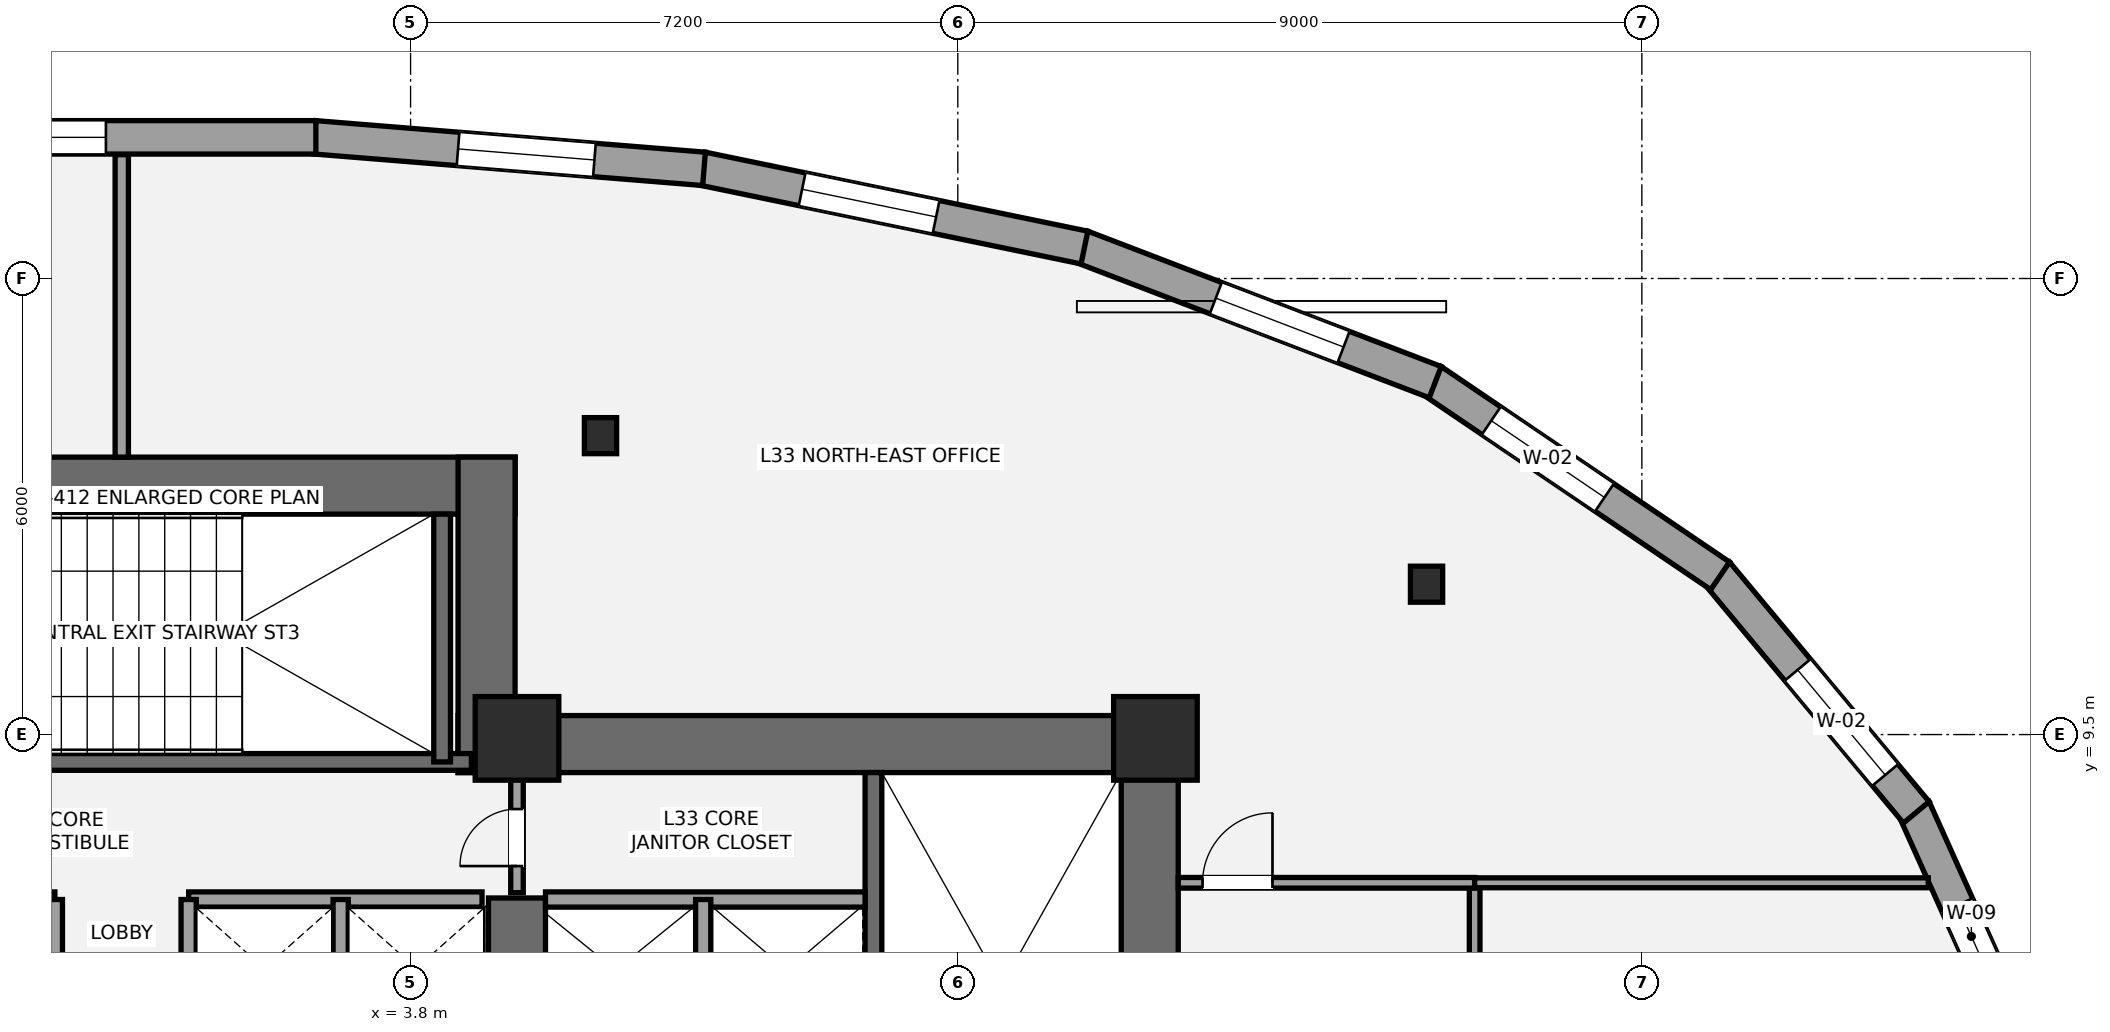
"""IFC4 building model, lengths in metres.
Left out: names, types, materials, properties, quantities, classifications, styles, units other than length and angle.
Written with IfcOpenShell. Run it as: python <this file> out.ifc"""

import sys

from ifc_helpers import new_model, si_unit, direction, frame, frame_2d, origin, origin_2d, place, context, subcontext, project, spatial, rectangle, i_section, extrude, element, fill, save


model = new_model("IFC4")
c1 = context("Model", 3, precision=1e-05, world=origin(), true_north=direction((0.0, 1.0)))
c2 = subcontext(c1, "Body", "Model", "MODEL_VIEW")
j1 = project(units=[si_unit("LENGTHUNIT", "METRE"), si_unit("PLANEANGLEUNIT", "RADIAN")], contexts=[c1])
p1 = place(None, origin())
s1 = spatial("IfcSite", under=j1, at=p1, CompositionType="ELEMENT")
p2 = place(p1, origin())
s2 = spatial("IfcBuilding", under=s1, at=p2, CompositionType="ELEMENT")
p3 = place(p2, frame((0.0, 0.0, 124.6)))
s3 = spatial("IfcBuildingStorey", under=s2, at=p3, CompositionType="ELEMENT", Elevation=124.6)
p4 = place(p3, frame((13.525, 1.1, 0.0), z_axis=(0.0, 0.0, 1.0), x_axis=(0.0, 1.0, 0.0)))
e1 = element("IfcWall", 1, at=p4, inside=s3, PredefinedType="SHEAR", context=c2, shape_type="SweptSolid", body=[
    extrude(rectangle(XDim=8.65, YDim=0.75, at=frame_2d((4.325, 0.0))), origin(), (0.0, 0.0, 1.0), 3.5),
])
p5 = place(p3, frame((4.425, 9.375, 0.0), z_axis=(0.0, 0.0, 1.0), x_axis=(1.0, 0.0, 0.0)))
e2 = element("IfcWall", 2, at=p5, inside=s3, PredefinedType="SHEAR", context=c2, shape_type="SweptSolid", body=[
    extrude(rectangle(XDim=9.475, YDim=0.75, at=frame_2d((4.737, 0.0))), origin(), (0.0, 0.0, 1.0), 3.5),
])
p6 = place(p3, frame((5.2, 5.35, 0.0), z_axis=(0.0, 0.0, 1.0), x_axis=(0.0, 1.0, 0.0)))
e3 = element("IfcWall", 3, at=p6, inside=s3, PredefinedType="SHEAR", context=c2, shape_type="SweptSolid", body=[
    extrude(rectangle(XDim=2.0, YDim=0.75, at=frame_2d((1.0, 0.0))), origin(), (0.0, 0.0, 1.0), 3.5),
])
p7 = place(p3, frame((9.89, 1.85, 0.0), z_axis=(0.0, 0.0, 1.0), x_axis=(0.0, 1.0, 0.0)))
e4 = element("IfcWall", 4, at=p7, inside=s3, PredefinedType="SHEAR", context=c2, shape_type="SweptSolid", body=[
    extrude(rectangle(XDim=7.15, YDim=0.22, at=frame_2d((3.575, 0.0))), origin(), (0.0, 0.0, 1.0), 3.5),
])
p8 = place(p3, frame((-5.175, 12.775, 0.0), z_axis=(0.0, 0.0, 1.0), x_axis=(1.0, 0.0, 0.0)))
e5 = element("IfcWall", 5, at=p8, inside=s3, PredefinedType="SHEAR", context=c2, shape_type="SweptSolid", body=[
    extrude(rectangle(XDim=10.35, YDim=0.75, at=frame_2d((5.175, 0.0))), origin(), (0.0, 0.0, 1.0), 3.5),
])
p9 = place(p3, frame((4.8, 9.0, 0.0), z_axis=(0.0, 0.0, 1.0), x_axis=(0.0, 1.0, 0.0)))
e6 = element("IfcWall", 6, at=p9, inside=s3, PredefinedType="SHEAR", context=c2, shape_type="SweptSolid", body=[
    extrude(rectangle(XDim=4.15, YDim=0.75, at=frame_2d((2.075, 0.0))), origin(), (0.0, 0.0, 1.0), 3.5),
])
p10 = place(p3, frame((-4.7, 9.14, 0.0), z_axis=(0.0, 0.0, 1.0), x_axis=(1.0, 0.0, 0.0)))
e7 = element("IfcWall", 7, at=p10, inside=s3, PredefinedType="SHEAR", context=c2, shape_type="SweptSolid", body=[
    extrude(rectangle(XDim=9.3, YDim=0.22, at=frame_2d((4.65, 0.0))), origin(), (0.0, 0.0, 1.0), 3.5),
])
p11 = place(p10, frame((1.15, 0.0, 0.0)))
e8 = element("IfcOpeningElement", 8, at=p11, cuts=e7, PredefinedType="OPENING", context=c2, shape_type="SweptSolid", body=[
    extrude(rectangle(XDim=1.05, YDim=2.15, at=frame_2d((0.525, 1.075))), frame((0.0, 0.12, 0.0), z_axis=(0.0, -1.0, 0.0), x_axis=(1.0, 0.0, 0.0)), (0.0, 0.0, 1.0), 0.24),
])
p12 = place(p3, frame((4.215, 9.14, 0.0), z_axis=(0.0, 0.0, 1.0), x_axis=(0.0, 1.0, 0.0)))
e9 = element("IfcWall", 9, at=p12, inside=s3, PredefinedType="SHEAR", context=c2, shape_type="SweptSolid", body=[
    extrude(rectangle(XDim=3.26, YDim=0.22, at=frame_2d((1.63, 0.0))), origin(), (0.0, 0.0, 1.0), 3.5),
])
for number, where, z_axis, x_axis in (
    (10, (5.2, 9.45, 0.0), (0.0, 0.0, 1.0), (1.0, 0.0, 0.0)),
    (11, (13.6, 9.45, 0.0), (0.0, 0.0, 1.0), (1.0, 0.0, 0.0)),
):
    element("IfcColumn", number, at=place(p3, frame(where, z_axis=z_axis, x_axis=x_axis)), inside=s3, PredefinedType="COLUMN", context=c2, shape_type="SweptSolid", body=[
        extrude(rectangle(XDim=1.1, YDim=1.1, at=origin_2d()), origin(), (0.0, 0.0, 1.0), 3.5),
    ])
for number, where, z_axis, x_axis in (
    (12, (17.167, 11.478, 0.0), (0.0, 0.0, 1.0), (1.0, 0.0, 0.0)),
    (13, (6.299, 13.433, 0.0), (0.0, 0.0, 1.0), (1.0, 0.0, 0.0)),
):
    element("IfcColumn", number, at=place(p3, frame(where, z_axis=z_axis, x_axis=x_axis)), inside=s3, PredefinedType="COLUMN", context=c2, shape_type="SweptSolid", body=[
        extrude(i_section(OverallWidth=0.424, OverallDepth=0.474, WebThickness=0.048, FlangeThickness=0.077, at=origin_2d()), origin(), (0.0, 0.0, 1.0), 3.5),
    ])
p13 = place(p3, frame((23.579, 8.528, 0.0), z_axis=(0.0, 0.0, 1.0), x_axis=(0.409835385481, -0.912159501846, 0.0)))
e14 = element("IfcWall", 14, at=p13, inside=s3, PredefinedType="STANDARD", context=c2, shape_type="SweptSolid", body=[
    extrude(rectangle(XDim=3.74, YDim=0.44, at=frame_2d((1.87, 0.0))), origin(), (0.0, 0.0, 1.0), 2.528),
])
p14 = place(p13, frame((1.395, 0.0, 0.58)))
e15 = element("IfcOpeningElement", 15, at=p14, cuts=e14, PredefinedType="OPENING", context=c2, shape_type="SweptSolid", body=[
    extrude(rectangle(XDim=0.9, YDim=1.35, at=frame_2d((0.45, 0.675))), frame((0.0, 0.23, 0.0), z_axis=(0.0, -1.0, 0.0), x_axis=(1.0, 0.0, 0.0)), (0.0, 0.0, 1.0), 0.46),
])
p15 = place(p3, frame((20.984, 11.629, 0.0), z_axis=(0.0, 0.0, 1.0), x_axis=(0.640084904994, -0.768304180906, 0.0)))
e16 = element("IfcWall", 16, at=p15, inside=s3, PredefinedType="STANDARD", context=c2, shape_type="SweptSolid", body=[
    extrude(rectangle(XDim=4.103, YDim=0.44, at=frame_2d((2.052, 0.0))), origin(), (0.0, 0.0, 1.0), 2.528),
])
p16 = place(p15, frame((1.664, 0.0, 0.65)))
e17 = element("IfcOpeningElement", 17, at=p16, cuts=e16, PredefinedType="OPENING", context=c2, shape_type="SweptSolid", body=[
    extrude(rectangle(XDim=1.8, YDim=1.7, at=frame_2d((0.9, 0.85))), frame((0.0, 0.23, 0.0), z_axis=(0.0, -1.0, 0.0), x_axis=(1.0, 0.0, 0.0)), (0.0, 0.0, 1.0), 0.46),
])
p17 = place(p3, frame((17.237, 14.16, 0.0), z_axis=(0.0, 0.0, 1.0), x_axis=(0.827672849676, -0.561210881852, 0.0)))
e18 = element("IfcWall", 18, at=p17, inside=s3, PredefinedType="STANDARD", context=c2, shape_type="SweptSolid", body=[
    extrude(rectangle(XDim=4.583, YDim=0.44, at=frame_2d((2.292, 0.0))), origin(), (0.0, 0.0, 1.0), 2.528),
])
p18 = place(p17, frame((0.945, 0.0, 0.65)))
e19 = element("IfcOpeningElement", 19, at=p18, cuts=e18, PredefinedType="OPENING", context=c2, shape_type="SweptSolid", body=[
    extrude(rectangle(XDim=1.8, YDim=1.7, at=frame_2d((0.9, 0.85))), frame((0.0, 0.23, 0.0), z_axis=(0.0, -1.0, 0.0), x_axis=(1.0, 0.0, 0.0)), (0.0, 0.0, 1.0), 0.46),
])
p19 = place(p3, frame((12.632, 15.917, 0.0), z_axis=(0.0, 0.0, 1.0), x_axis=(0.933853964101, -0.357654545243, 0.0)))
e20 = element("IfcWall", 20, at=p19, inside=s3, PredefinedType="STANDARD", context=c2, shape_type="SweptSolid", body=[
    extrude(rectangle(XDim=4.979, YDim=0.44, at=frame_2d((2.49, 0.0))), origin(), (0.0, 0.0, 1.0), 2.528),
])
p20 = place(p19, frame((1.887, 0.0, 0.65)))
e21 = element("IfcOpeningElement", 21, at=p20, cuts=e20, PredefinedType="OPENING", context=c2, shape_type="SweptSolid", body=[
    extrude(rectangle(XDim=1.8, YDim=1.7, at=frame_2d((0.9, 0.85))), frame((0.0, 0.23, 0.0), z_axis=(0.0, -1.0, 0.0), x_axis=(1.0, 0.0, 0.0)), (0.0, 0.0, 1.0), 0.46),
])
p21 = place(p3, frame((7.634, 16.946, 0.0), z_axis=(0.0, 0.0, 1.0), x_axis=(0.979339014215, -0.202225357552, 0.0)))
e22 = element("IfcWall", 22, at=p21, inside=s3, PredefinedType="STANDARD", context=c2, shape_type="SweptSolid", body=[
    extrude(rectangle(XDim=5.138, YDim=0.44, at=frame_2d((2.569, 0.0))), origin(), (0.0, 0.0, 1.0), 2.528),
])
p22 = place(p21, frame((1.345, 0.0, 0.65)))
e23 = element("IfcOpeningElement", 23, at=p22, cuts=e22, PredefinedType="OPENING", context=c2, shape_type="SweptSolid", body=[
    extrude(rectangle(XDim=1.8, YDim=1.7, at=frame_2d((0.9, 0.85))), frame((0.0, 0.23, 0.0), z_axis=(0.0, -1.0, 0.0), x_axis=(1.0, 0.0, 0.0)), (0.0, 0.0, 1.0), 0.46),
])
p23 = place(p3, frame((2.536, 17.358, 0.0), z_axis=(0.0, 0.0, 1.0), x_axis=(0.996733078328, -0.080766147401, 0.0)))
e24 = element("IfcWall", 24, at=p23, inside=s3, PredefinedType="STANDARD", context=c2, shape_type="SweptSolid", body=[
    extrude(rectangle(XDim=5.142, YDim=0.44, at=frame_2d((2.571, 0.0))), origin(), (0.0, 0.0, 1.0), 2.528),
])
p24 = place(p23, frame((1.895, 0.0, 0.65)))
e25 = element("IfcOpeningElement", 25, at=p24, cuts=e24, PredefinedType="OPENING", context=c2, shape_type="SweptSolid", body=[
    extrude(rectangle(XDim=1.8, YDim=1.7, at=frame_2d((0.9, 0.85))), frame((0.0, 0.23, 0.0), z_axis=(0.0, -1.0, 0.0), x_axis=(1.0, 0.0, 0.0)), (0.0, 0.0, 1.0), 0.46),
])
p25 = place(p3, frame((-2.553, 17.357, 0.0), z_axis=(0.0, 0.0, 1.0), x_axis=(1.0, 0.0, 0.0)))
e26 = element("IfcWall", 26, at=p25, inside=s3, PredefinedType="STANDARD", context=c2, shape_type="SweptSolid", body=[
    extrude(rectangle(XDim=5.107, YDim=0.44, at=frame_2d((2.553, 0.0))), origin(), (0.0, 0.0, 1.0), 2.528),
])
p26 = place(p25, frame((0.545, 0.0, 0.65)))
e27 = element("IfcOpeningElement", 27, at=p26, cuts=e26, PredefinedType="OPENING", context=c2, shape_type="SweptSolid", body=[
    extrude(rectangle(XDim=1.8, YDim=1.7, at=frame_2d((0.9, 0.85))), frame((0.0, 0.23, 0.0), z_axis=(0.0, -1.0, 0.0), x_axis=(1.0, 0.0, 0.0)), (0.0, 0.0, 1.0), 0.46),
])
p27 = place(p3, frame((5.575, 7.33, 0.0), z_axis=(0.0, 0.0, 1.0), x_axis=(1.0, 0.0, 0.0)))
e28 = element("IfcWall", 28, at=p27, inside=s3, PredefinedType="SOLIDWALL", context=c2, shape_type="SweptSolid", body=[
    extrude(rectangle(XDim=4.205, YDim=0.2, at=frame_2d((2.103, 0.0))), origin(), (0.0, 0.0, 1.0), 3.31),
])
p28 = place(p3, frame((7.65, 5.47, 0.0), z_axis=(0.0, 0.0, 1.0), x_axis=(0.0, 1.0, 0.0)))
e29 = element("IfcWall", 29, at=p28, inside=s3, PredefinedType="SOLIDWALL", context=c2, shape_type="SweptSolid", body=[
    extrude(rectangle(XDim=1.86, YDim=0.2, at=frame_2d((0.93, 0.0))), origin(), (0.0, 0.0, 1.0), 3.31),
])
for number, where, z_axis, x_axis in (
    (30, (-4.74, 7.33, 0.0), (0.0, 0.0, 1.0), (1.0, 0.0, 0.0)),
    (31, (0.88, 7.33, 0.0), (0.0, 0.0, 1.0), (1.0, 0.0, 0.0)),
):
    element("IfcWall", number, at=place(p3, frame(where, z_axis=z_axis, x_axis=x_axis)), inside=s3, PredefinedType="SOLIDWALL", context=c2, shape_type="SweptSolid", body=[
        extrude(rectangle(XDim=3.86, YDim=0.2, at=frame_2d((1.93, 0.0))), origin(), (0.0, 0.0, 1.0), 3.31),
    ])
for number, where, z_axis, x_axis in (
    (32, (2.88, 5.52, 0.0), (0.0, 0.0, 1.0), (0.0, 1.0, 0.0)),
    (33, (-0.88, 5.52, 0.0), (0.0, 0.0, 1.0), (0.0, 1.0, 0.0)),
    (34, (0.88, 5.52, 0.0), (0.0, 0.0, 1.0), (0.0, 1.0, 0.0)),
):
    element("IfcWall", number, at=place(p3, frame(where, z_axis=z_axis, x_axis=x_axis)), inside=s3, PredefinedType="SOLIDWALL", context=c2, shape_type="SweptSolid", body=[
        extrude(rectangle(XDim=1.81, YDim=0.2, at=frame_2d((0.905, 0.0))), origin(), (0.0, 0.0, 1.0), 3.31),
    ])
p29 = place(p3, frame((5.2, 7.42, 0.0), z_axis=(0.0, 0.0, 1.0), x_axis=(0.0, 1.0, 0.0)))
e35 = element("IfcWall", 35, at=p29, inside=s3, PredefinedType="PARTITIONING", context=c2, shape_type="SweptSolid", body=[
    extrude(rectangle(XDim=1.58, YDim=0.165, at=frame_2d((0.79, 0.0))), origin(), (0.0, 0.0, 1.0), 3.31),
])
p30 = place(p29, frame((0.35, 0.0, 0.0)))
e36 = element("IfcOpeningElement", 36, at=p30, cuts=e35, PredefinedType="OPENING", context=c2, shape_type="SweptSolid", body=[
    extrude(rectangle(XDim=0.75, YDim=2.1, at=frame_2d((0.375, 1.05))), frame((0.0, 0.093, 0.0), z_axis=(0.0, -1.0, 0.0), x_axis=(1.0, 0.0, 0.0)), (0.0, 0.0, 1.0), 0.185),
])
p31 = place(p3, frame((17.8, -13.502, 0.0), z_axis=(0.0, 0.0, 1.0), x_axis=(0.0, 1.0, 0.0)))
e37 = element("IfcWall", 37, at=p31, inside=s3, PredefinedType="PARTITIONING", context=c2, shape_type="SweptSolid", body=[
    extrude(rectangle(XDim=21.052, YDim=0.14, at=frame_2d((10.526, 0.0))), origin(), (0.0, 0.0, 1.0), 2.688),
])
p32 = place(p31, frame((11.153, 0.0, 0.0)))
e38 = element("IfcOpeningElement", 38, at=p32, cuts=e37, PredefinedType="OPENING", context=c2, shape_type="SweptSolid", body=[
    extrude(rectangle(XDim=0.9, YDim=2.1, at=frame_2d((0.45, 1.05))), frame((0.0, 0.08, 0.0), z_axis=(0.0, -1.0, 0.0), x_axis=(1.0, 0.0, 0.0)), (0.0, 0.0, 1.0), 0.16),
])
p33 = place(p31, frame((18.028, 0.0, 0.0)))
e39 = element("IfcOpeningElement", 39, at=p33, cuts=e37, PredefinedType="OPENING", context=c2, shape_type="SweptSolid", body=[
    extrude(rectangle(XDim=0.9, YDim=2.1, at=frame_2d((0.45, 1.05))), frame((0.0, 0.08, 0.0), z_axis=(0.0, -1.0, 0.0), x_axis=(1.0, 0.0, 0.0)), (0.0, 0.0, 1.0), 0.16),
])
p34 = place(p3, frame((13.9, 7.55, 0.0), z_axis=(0.0, 0.0, 1.0), x_axis=(1.0, 0.0, 0.0)))
e40 = element("IfcWall", 40, at=p34, inside=s3, PredefinedType="PARTITIONING", context=c2, shape_type="SweptSolid", body=[
    extrude(rectangle(XDim=3.9, YDim=0.14, at=frame_2d((1.95, 0.0))), origin(), (0.0, 0.0, 1.0), 2.763),
])
p35 = place(p34, frame((0.32, 0.0, 0.0)))
e41 = element("IfcOpeningElement", 41, at=p35, cuts=e40, PredefinedType="OPENING", context=c2, shape_type="SweptSolid", body=[
    extrude(rectangle(XDim=0.92, YDim=2.15, at=frame_2d((0.46, 1.075))), frame((0.0, 0.08, 0.0), z_axis=(0.0, -1.0, 0.0), x_axis=(1.0, 0.0, 0.0)), (0.0, 0.0, 1.0), 0.16),
])
p36 = place(p3, frame((0.0, 13.15, 0.0), z_axis=(0.0, 0.0, 1.0), x_axis=(0.0, 1.0, 0.0)))
e42 = element("IfcWall", 42, at=p36, inside=s3, PredefinedType="PARTITIONING", context=c2, shape_type="SweptSolid", body=[
    extrude(rectangle(XDim=3.979, YDim=0.175, at=frame_2d((1.99, 0.0))), origin(), (0.0, 0.0, 1.0), 3.31),
])
p37 = place(p3, frame((17.8, 7.55, 0.0), z_axis=(0.0, 0.0, 1.0), x_axis=(1.0, 0.0, 0.0)))
e43 = element("IfcWall", 43, at=p37, inside=s3, PredefinedType="PARTITIONING", context=c2, shape_type="SweptSolid", body=[
    extrude(rectangle(XDim=5.968, YDim=0.13, at=frame_2d((2.984, 0.0))), origin(), (0.0, 0.0, 1.0), 2.763),
])
p38 = place(p14, origin())
e44 = element("IfcWindow", 44, at=p38, inside=s3, PartitioningType="SINGLE_PANEL", PredefinedType="WINDOW", context=c2, shape_type="SweptSolid", body=[
    extrude(rectangle(XDim=0.9, YDim=1.35, at=frame_2d((0.45, 0.675))), frame((0.0, -0.01, 0.0), z_axis=(0.0, -1.0, 0.0), x_axis=(1.0, 0.0, 0.0)), (0.0, 0.0, 1.0), 0.06),
])
fill(e15, e44)
p39 = place(p16, origin())
e45 = element("IfcWindow", 45, at=p39, inside=s3, PartitioningType="SINGLE_PANEL", PredefinedType="WINDOW", context=c2, shape_type="SweptSolid", body=[
    extrude(rectangle(XDim=1.8, YDim=1.7, at=frame_2d((0.9, 0.85))), frame((0.0, -0.01, 0.0), z_axis=(0.0, -1.0, 0.0), x_axis=(1.0, 0.0, 0.0)), (0.0, 0.0, 1.0), 0.06),
])
fill(e17, e45)
p40 = place(p18, origin())
e46 = element("IfcWindow", 46, at=p40, inside=s3, PartitioningType="SINGLE_PANEL", PredefinedType="WINDOW", context=c2, shape_type="SweptSolid", body=[
    extrude(rectangle(XDim=1.8, YDim=1.7, at=frame_2d((0.9, 0.85))), frame((0.0, -0.01, 0.0), z_axis=(0.0, -1.0, 0.0), x_axis=(1.0, 0.0, 0.0)), (0.0, 0.0, 1.0), 0.06),
])
fill(e19, e46)
p41 = place(p20, origin())
e47 = element("IfcWindow", 47, at=p41, inside=s3, PartitioningType="SINGLE_PANEL", PredefinedType="WINDOW", context=c2, shape_type="SweptSolid", body=[
    extrude(rectangle(XDim=1.8, YDim=1.7, at=frame_2d((0.9, 0.85))), frame((0.0, -0.01, 0.0), z_axis=(0.0, -1.0, 0.0), x_axis=(1.0, 0.0, 0.0)), (0.0, 0.0, 1.0), 0.06),
])
fill(e21, e47)
p42 = place(p22, origin())
e48 = element("IfcWindow", 48, at=p42, inside=s3, PartitioningType="SINGLE_PANEL", PredefinedType="WINDOW", context=c2, shape_type="SweptSolid", body=[
    extrude(rectangle(XDim=1.8, YDim=1.7, at=frame_2d((0.9, 0.85))), frame((0.0, -0.01, 0.0), z_axis=(0.0, -1.0, 0.0), x_axis=(1.0, 0.0, 0.0)), (0.0, 0.0, 1.0), 0.06),
])
fill(e23, e48)
p43 = place(p24, origin())
e49 = element("IfcWindow", 49, at=p43, inside=s3, PartitioningType="SINGLE_PANEL", PredefinedType="WINDOW", context=c2, shape_type="SweptSolid", body=[
    extrude(rectangle(XDim=1.8, YDim=1.7, at=frame_2d((0.9, 0.85))), frame((0.0, -0.01, 0.0), z_axis=(0.0, -1.0, 0.0), x_axis=(1.0, 0.0, 0.0)), (0.0, 0.0, 1.0), 0.06),
])
fill(e25, e49)
p44 = place(p26, origin())
e50 = element("IfcWindow", 50, at=p44, inside=s3, PartitioningType="SINGLE_PANEL", PredefinedType="WINDOW", context=c2, shape_type="SweptSolid", body=[
    extrude(rectangle(XDim=1.8, YDim=1.7, at=frame_2d((0.9, 0.85))), frame((0.0, -0.01, 0.0), z_axis=(0.0, -1.0, 0.0), x_axis=(1.0, 0.0, 0.0)), (0.0, 0.0, 1.0), 0.06),
])
fill(e27, e50)
p45 = place(p30, origin())
e51 = element("IfcDoor", 51, at=p45, inside=s3, OperationType="SINGLE_SWING_LEFT", PredefinedType="DOOR", context=c2, shape_type="SweptSolid", body=[
    extrude(rectangle(XDim=0.75, YDim=2.1, at=frame_2d((0.375, 1.05))), frame((0.0, 0.025, 0.0), z_axis=(0.0, -1.0, 0.0), x_axis=(1.0, 0.0, 0.0)), (0.0, 0.0, 1.0), 0.05),
])
fill(e36, e51)
p46 = place(p35, origin())
e52 = element("IfcDoor", 52, at=p46, inside=s3, OperationType="SINGLE_SWING_RIGHT", PredefinedType="DOOR", context=c2, shape_type="SweptSolid", body=[
    extrude(rectangle(XDim=0.92, YDim=2.15, at=frame_2d((0.46, 1.075))), frame((0.0, 0.025, 0.0), z_axis=(0.0, -1.0, 0.0), x_axis=(1.0, 0.0, 0.0)), (0.0, 0.0, 1.0), 0.05),
])
fill(e41, e52)
save(model, sys.argv[1])
